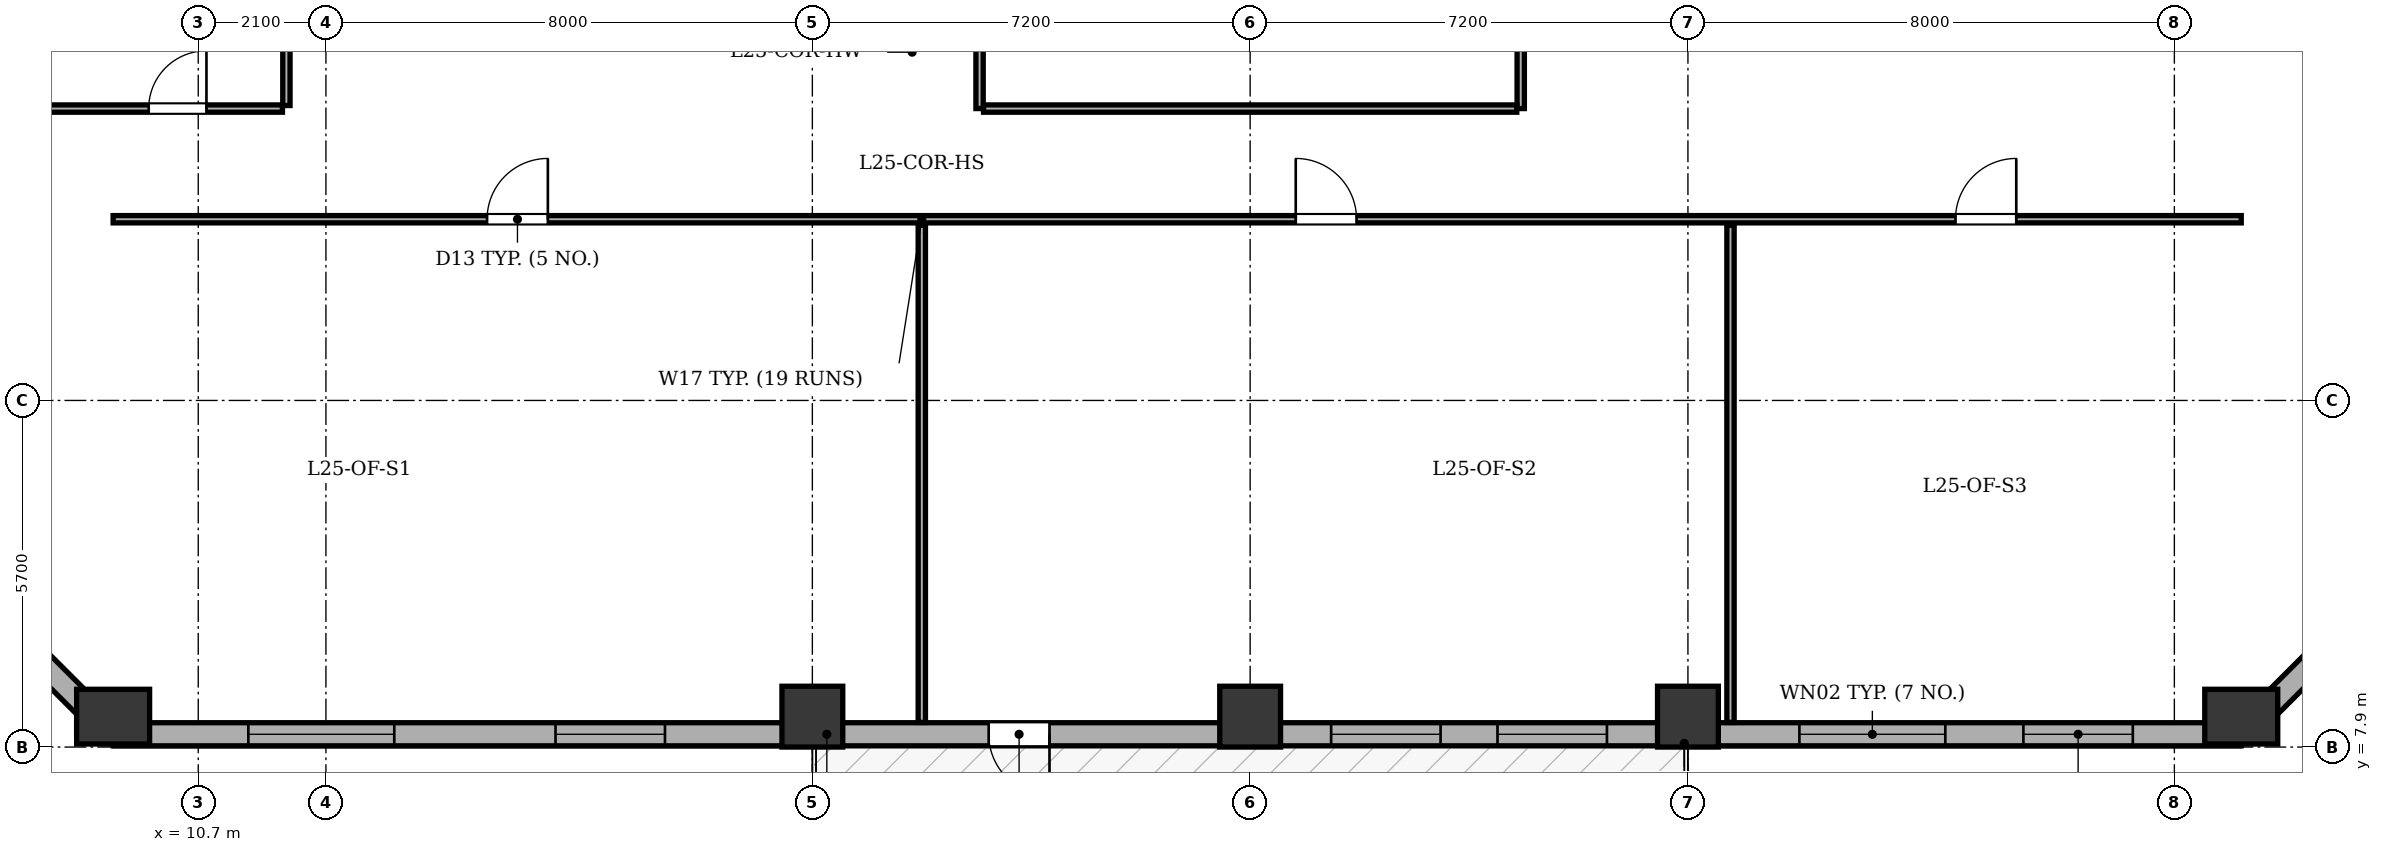
"""IFC4 building model, lengths in metres.
Left out: names, types, materials, properties, quantities, classifications, styles, units other than length and angle.
Written with IfcOpenShell. Run it as: python <this file> out.ifc"""

import sys

from ifc_helpers import new_model, si_unit, direction, frame, frame_2d, origin, origin_2d, place, context, subcontext, project, spatial, rectangle, extrude, element, fill, save


model = new_model("IFC4")
c1 = context("Model", 3, precision=1e-05, world=origin(), true_north=direction((0.0, 1.0)))
c2 = subcontext(c1, "Body", "Model", "MODEL_VIEW")
j1 = project(units=[si_unit("LENGTHUNIT", "METRE"), si_unit("PLANEANGLEUNIT", "RADIAN")], contexts=[c1])
p1 = place(None, origin())
s1 = spatial("IfcSite", under=j1, at=p1, CompositionType="ELEMENT")
p2 = place(p1, origin())
s2 = spatial("IfcBuilding", under=s1, at=p2, CompositionType="ELEMENT")
p3 = place(p2, frame((0.0, 0.0, 102.3)))
s3 = spatial("IfcBuildingStorey", under=s2, at=p3, CompositionType="ELEMENT", Elevation=102.3)
p4 = place(p3, frame((9.3, 8.4, 0.0), z_axis=(0.0, 0.0, 1.0), x_axis=(1.0, 0.0, 0.0)))
e1 = element("IfcColumn", 1, at=p4, inside=s3, PredefinedType="COLUMN", context=c2, shape_type="SweptSolid", body=[
    extrude(rectangle(XDim=0.9, YDim=1.2, at=origin_2d()), origin(), (0.0, 0.0, 1.0), 3.9),
])
for number, where, z_axis, x_axis in (
    (2, (20.8, 8.4, 0.0), (0.0, 0.0, 1.0), (1.0, 0.0, 0.0)),
    (3, (28.0, 8.4, 0.0), (0.0, 0.0, 1.0), (1.0, 0.0, 0.0)),
    (4, (35.2, 8.4, 0.0), (0.0, 0.0, 1.0), (1.0, 0.0, 0.0)),
):
    element("IfcColumn", number, at=place(p3, frame(where, z_axis=z_axis, x_axis=x_axis)), inside=s3, PredefinedType="COLUMN", context=c2, shape_type="SweptSolid", body=[
        extrude(rectangle(XDim=1.0, YDim=1.0, at=origin_2d()), origin(), (0.0, 0.0, 1.0), 3.9),
    ])
p5 = place(p3, frame((44.3, 8.4, 0.0), z_axis=(0.0, 0.0, 1.0), x_axis=(1.0, 0.0, 0.0)))
e5 = element("IfcColumn", 5, at=p5, inside=s3, PredefinedType="COLUMN", context=c2, shape_type="SweptSolid", body=[
    extrude(rectangle(XDim=0.9, YDim=1.2, at=origin_2d()), origin(), (0.0, 0.0, 1.0), 3.9),
])
p6 = place(p3, frame((44.3, 8.11, 0.0), z_axis=(0.0, 0.0, 1.0), x_axis=(-1.0, 0.0, 0.0)))
e6 = element("IfcWall", 6, at=p6, inside=s3, PredefinedType="STANDARD", context=c2, shape_type="SweptSolid", body=[
    extrude(rectangle(XDim=35.0, YDim=0.38, at=frame_2d((17.5, 0.0))), origin(), (0.0, 0.0, 1.0), 3.135),
])
p7 = place(p6, frame((19.6, 0.0, 0.0)))
e7 = element("IfcOpeningElement", 7, at=p7, cuts=e6, PredefinedType="OPENING", context=c2, shape_type="SweptSolid", body=[
    extrude(rectangle(XDim=1.0, YDim=2.02, at=frame_2d((0.5, 1.01))), frame((0.0, 0.2, 0.0), z_axis=(0.0, -1.0, 0.0), x_axis=(1.0, 0.0, 0.0)), (0.0, 0.0, 1.0), 0.4),
])
p8 = place(p6, frame((1.783, 0.0, 0.8)))
e8 = element("IfcOpeningElement", 8, at=p8, cuts=e6, PredefinedType="OPENING", context=c2, shape_type="SweptSolid", body=[
    extrude(rectangle(XDim=1.8, YDim=1.9, at=frame_2d((0.9, 0.95))), frame((0.0, 0.2, 0.0), z_axis=(0.0, -1.0, 0.0), x_axis=(1.0, 0.0, 0.0)), (0.0, 0.0, 1.0), 0.4),
])
p9 = place(p6, frame((4.867, 0.0, 0.8)))
e9 = element("IfcOpeningElement", 9, at=p9, cuts=e6, PredefinedType="OPENING", context=c2, shape_type="SweptSolid", body=[
    extrude(rectangle(XDim=2.4, YDim=1.9, at=frame_2d((1.2, 0.95))), frame((0.0, 0.2, 0.0), z_axis=(0.0, -1.0, 0.0), x_axis=(1.0, 0.0, 0.0)), (0.0, 0.0, 1.0), 0.4),
])
p10 = place(p6, frame((10.432, 0.0, 0.8)))
e10 = element("IfcOpeningElement", 10, at=p10, cuts=e6, PredefinedType="OPENING", context=c2, shape_type="SweptSolid", body=[
    extrude(rectangle(XDim=1.8, YDim=1.9, at=frame_2d((0.9, 0.95))), frame((0.0, 0.2, 0.0), z_axis=(0.0, -1.0, 0.0), x_axis=(1.0, 0.0, 0.0)), (0.0, 0.0, 1.0), 0.4),
])
p11 = place(p6, frame((13.168, 0.0, 0.8)))
e11 = element("IfcOpeningElement", 11, at=p11, cuts=e6, PredefinedType="OPENING", context=c2, shape_type="SweptSolid", body=[
    extrude(rectangle(XDim=1.8, YDim=1.9, at=frame_2d((0.9, 0.95))), frame((0.0, 0.2, 0.0), z_axis=(0.0, -1.0, 0.0), x_axis=(1.0, 0.0, 0.0)), (0.0, 0.0, 1.0), 0.4),
])
p12 = place(p6, frame((25.924, 0.0, 0.8)))
e12 = element("IfcOpeningElement", 12, at=p12, cuts=e6, PredefinedType="OPENING", context=c2, shape_type="SweptSolid", body=[
    extrude(rectangle(XDim=1.8, YDim=1.9, at=frame_2d((0.9, 0.95))), frame((0.0, 0.2, 0.0), z_axis=(0.0, -1.0, 0.0), x_axis=(1.0, 0.0, 0.0)), (0.0, 0.0, 1.0), 0.4),
])
p13 = place(p6, frame((30.376, 0.0, 0.8)))
e13 = element("IfcOpeningElement", 13, at=p13, cuts=e6, PredefinedType="OPENING", context=c2, shape_type="SweptSolid", body=[
    extrude(rectangle(XDim=2.4, YDim=1.9, at=frame_2d((1.2, 0.95))), frame((0.0, 0.2, 0.0), z_axis=(0.0, -1.0, 0.0), x_axis=(1.0, 0.0, 0.0)), (0.0, 0.0, 1.0), 0.4),
])
p14 = place(p3, frame((9.3, 8.11, 0.0), z_axis=(0.0, 0.0, 1.0), x_axis=(-0.707124801467, 0.707088760447, 0.0)))
e14 = element("IfcWall", 14, at=p14, inside=s3, PredefinedType="STANDARD", context=c2, shape_type="SweptSolid", body=[
    extrude(rectangle(XDim=6.774, YDim=0.38, at=frame_2d((3.387, 0.0))), origin(), (0.0, 0.0, 1.0), 3.135),
])
p15 = place(p14, frame((2.687, 0.0, 0.8)))
e15 = element("IfcOpeningElement", 15, at=p15, cuts=e14, PredefinedType="OPENING", context=c2, shape_type="SweptSolid", body=[
    extrude(rectangle(XDim=1.4, YDim=1.65, at=frame_2d((0.7, 0.825))), frame((0.0, 0.2, 0.0), z_axis=(0.0, -1.0, 0.0), x_axis=(1.0, 0.0, 0.0)), (0.0, 0.0, 1.0), 0.4),
])
p16 = place(p3, frame((49.09, 12.9, 0.0), z_axis=(0.0, 0.0, 1.0), x_axis=(-0.707124801467, -0.707088760447, 0.0)))
e16 = element("IfcWall", 16, at=p16, inside=s3, PredefinedType="STANDARD", context=c2, shape_type="SweptSolid", body=[
    extrude(rectangle(XDim=6.774, YDim=0.38, at=frame_2d((3.387, 0.0))), origin(), (0.0, 0.0, 1.0), 3.135),
])
p17 = place(p16, frame((2.687, 0.0, 0.8)))
e17 = element("IfcOpeningElement", 17, at=p17, cuts=e16, PredefinedType="OPENING", context=c2, shape_type="SweptSolid", body=[
    extrude(rectangle(XDim=1.4, YDim=1.65, at=frame_2d((0.7, 0.825))), frame((0.0, 0.2, 0.0), z_axis=(0.0, -1.0, 0.0), x_axis=(1.0, 0.0, 0.0)), (0.0, 0.0, 1.0), 0.4),
])
for number, where, z_axis, x_axis in (
    (18, (23.55, 18.4, 0.0), (0.0, 0.0, 1.0), (0.0, 1.0, 0.0)),
    (19, (32.45, 18.4, 0.0), (0.0, 0.0, 1.0), (0.0, 1.0, 0.0)),
):
    element("IfcWall", number, at=place(p3, frame(where, z_axis=z_axis, x_axis=x_axis)), inside=s3, PredefinedType="PARTITIONING", context=c2, shape_type="SweptSolid", body=[
        extrude(rectangle(XDim=3.485, YDim=0.12, at=frame_2d((1.743, 0.0))), origin(), (0.0, 0.0, 1.0), 3.6),
    ])
p18 = place(p3, frame((23.615, 18.4, 0.0), z_axis=(0.0, 0.0, 1.0), x_axis=(1.0, 0.0, 0.0)))
e20 = element("IfcWall", 20, at=p18, inside=s3, PredefinedType="PARTITIONING", context=c2, shape_type="SweptSolid", body=[
    extrude(rectangle(XDim=8.77, YDim=0.12, at=frame_2d((4.385, 0.0))), origin(), (0.0, 0.0, 1.0), 3.6),
])
p19 = place(p3, frame((9.3, 16.58, 0.0), z_axis=(0.0, 0.0, 1.0), x_axis=(1.0, 0.0, 0.0)))
e21 = element("IfcWall", 21, at=p19, inside=s3, PredefinedType="PARTITIONING", context=c2, shape_type="SweptSolid", body=[
    extrude(rectangle(XDim=35.0, YDim=0.12, at=frame_2d((17.5, 0.0))), origin(), (0.0, 0.0, 1.0), 3.6),
])
p20 = place(p19, frame((6.15, 0.0, 0.0)))
e22 = element("IfcOpeningElement", 22, at=p20, cuts=e21, PredefinedType="OPENING", context=c2, shape_type="SweptSolid", body=[
    extrude(rectangle(XDim=1.0, YDim=2.1, at=frame_2d((0.5, 1.05))), frame((0.0, 0.07, 0.0), z_axis=(0.0, -1.0, 0.0), x_axis=(1.0, 0.0, 0.0)), (0.0, 0.0, 1.0), 0.14),
])
p21 = place(p19, frame((19.45, 0.0, 0.0)))
e23 = element("IfcOpeningElement", 23, at=p21, cuts=e21, PredefinedType="OPENING", context=c2, shape_type="SweptSolid", body=[
    extrude(rectangle(XDim=1.0, YDim=2.1, at=frame_2d((0.5, 1.05))), frame((0.0, 0.07, 0.0), z_axis=(0.0, -1.0, 0.0), x_axis=(1.0, 0.0, 0.0)), (0.0, 0.0, 1.0), 0.14),
])
p22 = place(p19, frame((30.3, 0.0, 0.0)))
e24 = element("IfcOpeningElement", 24, at=p22, cuts=e21, PredefinedType="OPENING", context=c2, shape_type="SweptSolid", body=[
    extrude(rectangle(XDim=1.0, YDim=2.1, at=frame_2d((0.5, 1.05))), frame((0.0, 0.07, 0.0), z_axis=(0.0, -1.0, 0.0), x_axis=(1.0, 0.0, 0.0)), (0.0, 0.0, 1.0), 0.14),
])
p23 = place(p3, frame((22.6, 8.305, 0.0), z_axis=(0.0, 0.0, 1.0), x_axis=(0.0, 1.0, 0.0)))
e25 = element("IfcWall", 25, at=p23, inside=s3, PredefinedType="PARTITIONING", context=c2, shape_type="SweptSolid", body=[
    extrude(rectangle(XDim=8.175, YDim=0.12, at=frame_2d((4.087, 0.0))), origin(), (0.0, 0.0, 1.0), 3.135),
])
p24 = place(p3, frame((35.9, 8.305, 0.0), z_axis=(0.0, 0.0, 1.0), x_axis=(0.0, 1.0, 0.0)))
e26 = element("IfcWall", 26, at=p24, inside=s3, PredefinedType="PARTITIONING", context=c2, shape_type="SweptSolid", body=[
    extrude(rectangle(XDim=8.175, YDim=0.12, at=frame_2d((4.087, 0.0))), origin(), (0.0, 0.0, 1.0), 3.6),
])
p25 = place(p3, frame((12.15, 18.45, 0.0), z_axis=(0.0, 0.0, 1.0), x_axis=(0.0, 1.0, 0.0)))
e27 = element("IfcWall", 27, at=p25, inside=s3, PredefinedType="PARTITIONING", context=c2, shape_type="SweptSolid", body=[
    extrude(rectangle(XDim=17.5, YDim=0.12, at=frame_2d((8.75, 0.0))), origin(), (0.0, 0.0, 1.0), 3.6),
])
p26 = place(p3, frame((4.705, 18.4, 0.0), z_axis=(0.0, 0.0, 1.0), x_axis=(1.0, 0.0, 0.0)))
e28 = element("IfcWall", 28, at=p26, inside=s3, PredefinedType="PARTITIONING", context=c2, shape_type="SweptSolid", body=[
    extrude(rectangle(XDim=7.38, YDim=0.12, at=frame_2d((3.69, 0.0))), origin(), (0.0, 0.0, 1.0), 3.6),
])
p27 = place(p26, frame((5.18, 0.0, 0.0)))
e29 = element("IfcOpeningElement", 29, at=p27, cuts=e28, PredefinedType="OPENING", context=c2, shape_type="SweptSolid", body=[
    extrude(rectangle(XDim=0.95, YDim=2.1, at=frame_2d((0.475, 1.05))), frame((0.0, 0.07, 0.0), z_axis=(0.0, -1.0, 0.0), x_axis=(1.0, 0.0, 0.0)), (0.0, 0.0, 1.0), 0.14),
])
p28 = place(p7, origin())
e30 = element("IfcDoor", 30, at=p28, inside=s3, OperationType="SINGLE_SWING_LEFT", PredefinedType="DOOR", context=c2, shape_type="SweptSolid", body=[
    extrude(rectangle(XDim=1.0, YDim=2.02, at=frame_2d((0.5, 1.01))), frame((0.0, 0.025, 0.0), z_axis=(0.0, -1.0, 0.0), x_axis=(1.0, 0.0, 0.0)), (0.0, 0.0, 1.0), 0.05),
])
fill(e7, e30)
p29 = place(p8, origin())
e31 = element("IfcWindow", 31, at=p29, inside=s3, PartitioningType="SINGLE_PANEL", PredefinedType="WINDOW", context=c2, shape_type="SweptSolid", body=[
    extrude(rectangle(XDim=1.8, YDim=1.9, at=frame_2d((0.9, 0.95))), frame((0.0, -0.01, 0.0), z_axis=(0.0, -1.0, 0.0), x_axis=(1.0, 0.0, 0.0)), (0.0, 0.0, 1.0), 0.06),
])
fill(e8, e31)
p30 = place(p9, origin())
e32 = element("IfcWindow", 32, at=p30, inside=s3, PartitioningType="SINGLE_PANEL", PredefinedType="WINDOW", context=c2, shape_type="SweptSolid", body=[
    extrude(rectangle(XDim=2.4, YDim=1.9, at=frame_2d((1.2, 0.95))), frame((0.0, -0.01, 0.0), z_axis=(0.0, -1.0, 0.0), x_axis=(1.0, 0.0, 0.0)), (0.0, 0.0, 1.0), 0.06),
])
fill(e9, e32)
p31 = place(p10, origin())
e33 = element("IfcWindow", 33, at=p31, inside=s3, PartitioningType="SINGLE_PANEL", PredefinedType="WINDOW", context=c2, shape_type="SweptSolid", body=[
    extrude(rectangle(XDim=1.8, YDim=1.9, at=frame_2d((0.9, 0.95))), frame((0.0, -0.01, 0.0), z_axis=(0.0, -1.0, 0.0), x_axis=(1.0, 0.0, 0.0)), (0.0, 0.0, 1.0), 0.06),
])
fill(e10, e33)
p32 = place(p11, origin())
e34 = element("IfcWindow", 34, at=p32, inside=s3, PartitioningType="SINGLE_PANEL", PredefinedType="WINDOW", context=c2, shape_type="SweptSolid", body=[
    extrude(rectangle(XDim=1.8, YDim=1.9, at=frame_2d((0.9, 0.95))), frame((0.0, -0.01, 0.0), z_axis=(0.0, -1.0, 0.0), x_axis=(1.0, 0.0, 0.0)), (0.0, 0.0, 1.0), 0.06),
])
fill(e11, e34)
p33 = place(p12, origin())
e35 = element("IfcWindow", 35, at=p33, inside=s3, PartitioningType="SINGLE_PANEL", PredefinedType="WINDOW", context=c2, shape_type="SweptSolid", body=[
    extrude(rectangle(XDim=1.8, YDim=1.9, at=frame_2d((0.9, 0.95))), frame((0.0, -0.01, 0.0), z_axis=(0.0, -1.0, 0.0), x_axis=(1.0, 0.0, 0.0)), (0.0, 0.0, 1.0), 0.06),
])
fill(e12, e35)
p34 = place(p13, origin())
e36 = element("IfcWindow", 36, at=p34, inside=s3, PartitioningType="SINGLE_PANEL", PredefinedType="WINDOW", context=c2, shape_type="SweptSolid", body=[
    extrude(rectangle(XDim=2.4, YDim=1.9, at=frame_2d((1.2, 0.95))), frame((0.0, -0.01, 0.0), z_axis=(0.0, -1.0, 0.0), x_axis=(1.0, 0.0, 0.0)), (0.0, 0.0, 1.0), 0.06),
])
fill(e13, e36)
p35 = place(p20, origin())
e37 = element("IfcDoor", 37, at=p35, inside=s3, OperationType="SINGLE_SWING_RIGHT", PredefinedType="DOOR", context=c2, shape_type="SweptSolid", body=[
    extrude(rectangle(XDim=1.0, YDim=2.1, at=frame_2d((0.5, 1.05))), frame((0.0, 0.025, 0.0), z_axis=(0.0, -1.0, 0.0), x_axis=(1.0, 0.0, 0.0)), (0.0, 0.0, 1.0), 0.05),
])
fill(e22, e37)
p36 = place(p21, origin())
e38 = element("IfcDoor", 38, at=p36, inside=s3, OperationType="SINGLE_SWING_LEFT", PredefinedType="DOOR", context=c2, shape_type="SweptSolid", body=[
    extrude(rectangle(XDim=1.0, YDim=2.1, at=frame_2d((0.5, 1.05))), frame((0.0, 0.025, 0.0), z_axis=(0.0, -1.0, 0.0), x_axis=(1.0, 0.0, 0.0)), (0.0, 0.0, 1.0), 0.05),
])
fill(e23, e38)
p37 = place(p22, origin())
e39 = element("IfcDoor", 39, at=p37, inside=s3, OperationType="SINGLE_SWING_RIGHT", PredefinedType="DOOR", context=c2, shape_type="SweptSolid", body=[
    extrude(rectangle(XDim=1.0, YDim=2.1, at=frame_2d((0.5, 1.05))), frame((0.0, 0.025, 0.0), z_axis=(0.0, -1.0, 0.0), x_axis=(1.0, 0.0, 0.0)), (0.0, 0.0, 1.0), 0.05),
])
fill(e24, e39)
p38 = place(p27, origin())
e40 = element("IfcDoor", 40, at=p38, inside=s3, OperationType="SINGLE_SWING_RIGHT", PredefinedType="DOOR", context=c2, shape_type="SweptSolid", body=[
    extrude(rectangle(XDim=0.95, YDim=2.1, at=frame_2d((0.475, 1.05))), frame((0.0, 0.025, 0.0), z_axis=(0.0, -1.0, 0.0), x_axis=(1.0, 0.0, 0.0)), (0.0, 0.0, 1.0), 0.05),
])
fill(e29, e40)
save(model, sys.argv[1])
